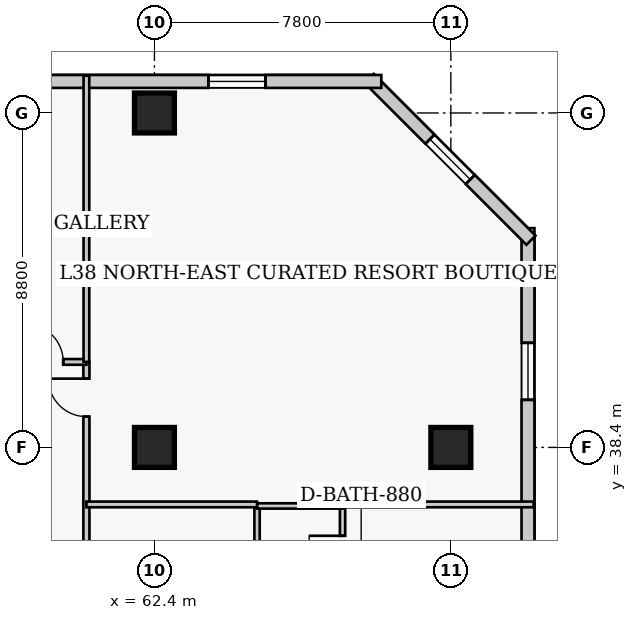
"""IFC4 building model, lengths in metres.
Left out: names, types, materials, properties, quantities, classifications, styles, units other than length and angle.
Written with IfcOpenShell. Run it as: python <this file> out.ifc"""

import sys

from ifc_helpers import new_model, si_unit, direction, frame, frame_2d, origin, origin_2d, place, context, subcontext, project, spatial, rectangle, extrude, element, fill, save


model = new_model("IFC4")
c1 = context("Model", 3, precision=1e-05, world=origin(), true_north=direction((0.0, 1.0)))
c2 = subcontext(c1, "Body", "Model", "MODEL_VIEW")
j1 = project(units=[si_unit("LENGTHUNIT", "METRE"), si_unit("PLANEANGLEUNIT", "RADIAN")], contexts=[c1])
p1 = place(None, origin())
s1 = spatial("IfcSite", under=j1, at=p1, CompositionType="ELEMENT")
p2 = place(p1, origin())
s2 = spatial("IfcBuilding", under=s1, at=p2, CompositionType="ELEMENT")
p3 = place(p2, frame((0.0, 0.0, 153.6)))
s3 = spatial("IfcBuildingStorey", under=s2, at=p3, CompositionType="ELEMENT", Elevation=153.6)
for number, where, z_axis, x_axis in (
    (1, (62.4, 38.4, 0.0), (0.0, 0.0, 1.0), (1.0, 0.0, 0.0)),
    (2, (62.4, 47.2, 0.0), (0.0, 0.0, 1.0), (1.0, 0.0, 0.0)),
    (3, (70.2, 38.4, 0.0), (0.0, 0.0, 1.0), (1.0, 0.0, 0.0)),
):
    element("IfcColumn", number, at=place(p3, frame(where, z_axis=z_axis, x_axis=x_axis)), inside=s3, PredefinedType="COLUMN", context=c2, shape_type="SweptSolid", body=[
        extrude(rectangle(XDim=1.05, YDim=1.05, at=origin_2d()), origin(), (0.0, 0.0, 1.0), 3.8),
    ])
p4 = place(p3, frame((72.23, 14.03, 0.0), z_axis=(0.0, 0.0, 1.0), x_axis=(0.0, 1.0, 0.0)))
e4 = element("IfcWall", 4, at=p4, inside=s3, PredefinedType="SOLIDWALL", context=c2, shape_type="SweptSolid", body=[
    extrude(rectangle(XDim=30.14, YDim=0.34, at=frame_2d((15.07, 0.0))), origin(), (0.0, 0.0, 1.0), 3.55),
])
p5 = place(p4, frame((3.018, 0.0, 0.85)))
e5 = element("IfcOpeningElement", 5, at=p5, cuts=e4, PredefinedType="OPENING", context=c2, shape_type="SweptSolid", body=[
    extrude(rectangle(XDim=1.5, YDim=1.75, at=frame_2d((0.75, 0.875))), frame((0.0, 0.18, 0.0), z_axis=(0.0, -1.0, 0.0), x_axis=(1.0, 0.0, 0.0)), (0.0, 0.0, 1.0), 0.36),
])
p6 = place(p4, frame((10.552, 0.0, 0.85)))
e6 = element("IfcOpeningElement", 6, at=p6, cuts=e4, PredefinedType="OPENING", context=c2, shape_type="SweptSolid", body=[
    extrude(rectangle(XDim=1.5, YDim=1.75, at=frame_2d((0.75, 0.875))), frame((0.0, 0.18, 0.0), z_axis=(0.0, -1.0, 0.0), x_axis=(1.0, 0.0, 0.0)), (0.0, 0.0, 1.0), 0.36),
])
p7 = place(p4, frame((18.087, 0.0, 0.85)))
e7 = element("IfcOpeningElement", 7, at=p7, cuts=e4, PredefinedType="OPENING", context=c2, shape_type="SweptSolid", body=[
    extrude(rectangle(XDim=1.5, YDim=1.75, at=frame_2d((0.75, 0.875))), frame((0.0, 0.18, 0.0), z_axis=(0.0, -1.0, 0.0), x_axis=(1.0, 0.0, 0.0)), (0.0, 0.0, 1.0), 0.36),
])
p8 = place(p4, frame((25.623, 0.0, 0.85)))
e8 = element("IfcOpeningElement", 8, at=p8, cuts=e4, PredefinedType="OPENING", context=c2, shape_type="SweptSolid", body=[
    extrude(rectangle(XDim=1.5, YDim=1.75, at=frame_2d((0.75, 0.875))), frame((0.0, 0.18, 0.0), z_axis=(0.0, -1.0, 0.0), x_axis=(1.0, 0.0, 0.0)), (0.0, 0.0, 1.0), 0.36),
])
p9 = place(p3, frame((72.308, 43.852, 0.0), z_axis=(0.0, 0.0, 1.0), x_axis=(-0.707106781187, 0.707106781187, 0.0)))
e9 = element("IfcWall", 9, at=p9, inside=s3, PredefinedType="SOLIDWALL", context=c2, shape_type="SweptSolid", body=[
    extrude(rectangle(XDim=6.02, YDim=0.34, at=frame_2d((3.01, 0.0))), origin(), (0.0, 0.0, 1.0), 3.55),
])
p10 = place(p9, frame((2.26, 0.0, 0.85)))
e10 = element("IfcOpeningElement", 10, at=p10, cuts=e9, PredefinedType="OPENING", context=c2, shape_type="SweptSolid", body=[
    extrude(rectangle(XDim=1.5, YDim=1.75, at=frame_2d((0.75, 0.875))), frame((0.0, 0.18, 0.0), z_axis=(0.0, -1.0, 0.0), x_axis=(1.0, 0.0, 0.0)), (0.0, 0.0, 1.0), 0.36),
])
p11 = place(p3, frame((68.37, 48.03, 0.0), z_axis=(0.0, 0.0, 1.0), x_axis=(-1.0, 0.0, 0.0)))
e11 = element("IfcWall", 11, at=p11, inside=s3, PredefinedType="SOLIDWALL", context=c2, shape_type="SweptSolid", body=[
    extrude(rectangle(XDim=26.69, YDim=0.34, at=frame_2d((13.345, 0.0))), origin(), (0.0, 0.0, 1.0), 3.55),
])
p12 = place(p11, frame((16.97, 0.0, 0.0)))
e12 = element("IfcOpeningElement", 12, at=p12, cuts=e11, PredefinedType="OPENING", context=c2, shape_type="SweptSolid", body=[
    extrude(rectangle(XDim=1.4, YDim=2.15, at=frame_2d((0.7, 1.075))), frame((0.0, 0.18, 0.0), z_axis=(0.0, -1.0, 0.0), x_axis=(1.0, 0.0, 0.0)), (0.0, 0.0, 1.0), 0.36),
])
p13 = place(p11, frame((3.048, 0.0, 0.85)))
e13 = element("IfcOpeningElement", 13, at=p13, cuts=e11, PredefinedType="OPENING", context=c2, shape_type="SweptSolid", body=[
    extrude(rectangle(XDim=1.5, YDim=1.75, at=frame_2d((0.75, 0.875))), frame((0.0, 0.18, 0.0), z_axis=(0.0, -1.0, 0.0), x_axis=(1.0, 0.0, 0.0)), (0.0, 0.0, 1.0), 0.36),
])
p14 = place(p11, frame((11.445, 0.0, 0.85)))
e14 = element("IfcOpeningElement", 14, at=p14, cuts=e11, PredefinedType="OPENING", context=c2, shape_type="SweptSolid", body=[
    extrude(rectangle(XDim=1.5, YDim=1.75, at=frame_2d((0.75, 0.875))), frame((0.0, 0.18, 0.0), z_axis=(0.0, -1.0, 0.0), x_axis=(1.0, 0.0, 0.0)), (0.0, 0.0, 1.0), 0.36),
])
p15 = place(p11, frame((22.642, 0.0, 0.85)))
e15 = element("IfcOpeningElement", 15, at=p15, cuts=e11, PredefinedType="OPENING", context=c2, shape_type="SweptSolid", body=[
    extrude(rectangle(XDim=1.5, YDim=1.75, at=frame_2d((0.75, 0.875))), frame((0.0, 0.18, 0.0), z_axis=(0.0, -1.0, 0.0), x_axis=(1.0, 0.0, 0.0)), (0.0, 0.0, 1.0), 0.36),
])
p16 = place(p3, frame((60.61, 12.05, 0.0), z_axis=(0.0, 0.0, 1.0), x_axis=(0.0, 1.0, 0.0)))
e16 = element("IfcWall", 16, at=p16, inside=s3, PredefinedType="PARTITIONING", context=c2, shape_type="SweptSolid", body=[
    extrude(rectangle(XDim=28.6, YDim=0.16, at=frame_2d((14.3, 0.0))), origin(), (0.0, 0.0, 1.0), 3.55),
])
p17 = place(p16, frame((3.5, 0.0, 0.0)))
e17 = element("IfcOpeningElement", 17, at=p17, cuts=e16, PredefinedType="OPENING", context=c2, shape_type="SweptSolid", body=[
    extrude(rectangle(XDim=0.95, YDim=2.1, at=frame_2d((0.475, 1.05))), frame((0.0, 0.09, 0.0), z_axis=(0.0, -1.0, 0.0), x_axis=(1.0, 0.0, 0.0)), (0.0, 0.0, 1.0), 0.18),
])
p18 = place(p16, frame((11.875, 0.0, 0.0)))
e18 = element("IfcOpeningElement", 18, at=p18, cuts=e16, PredefinedType="OPENING", context=c2, shape_type="SweptSolid", body=[
    extrude(rectangle(XDim=0.95, YDim=2.1, at=frame_2d((0.475, 1.05))), frame((0.0, 0.09, 0.0), z_axis=(0.0, -1.0, 0.0), x_axis=(1.0, 0.0, 0.0)), (0.0, 0.0, 1.0), 0.18),
])
p19 = place(p16, frame((20.325, 0.0, 0.0)))
e19 = element("IfcOpeningElement", 19, at=p19, cuts=e16, PredefinedType="OPENING", context=c2, shape_type="SweptSolid", body=[
    extrude(rectangle(XDim=0.95, YDim=2.1, at=frame_2d((0.475, 1.05))), frame((0.0, 0.09, 0.0), z_axis=(0.0, -1.0, 0.0), x_axis=(1.0, 0.0, 0.0)), (0.0, 0.0, 1.0), 0.18),
])
p20 = place(p16, frame((27.16, 0.0, 0.0)))
e20 = element("IfcOpeningElement", 20, at=p20, cuts=e16, PredefinedType="OPENING", context=c2, shape_type="SweptSolid", body=[
    extrude(rectangle(XDim=1.0, YDim=2.15, at=frame_2d((0.5, 1.075))), frame((0.0, 0.09, 0.0), z_axis=(0.0, -1.0, 0.0), x_axis=(1.0, 0.0, 0.0)), (0.0, 0.0, 1.0), 0.18),
])
p21 = place(p3, frame((56.8, 40.65, 0.0), z_axis=(0.0, 0.0, 1.0), x_axis=(1.0, 0.0, 0.0)))
e21 = element("IfcWall", 21, at=p21, inside=s3, PredefinedType="PARTITIONING", context=c2, shape_type="SweptSolid", body=[
    extrude(rectangle(XDim=3.81, YDim=0.15, at=frame_2d((1.905, 0.0))), origin(), (0.0, 0.0, 1.0), 3.55),
])
p22 = place(p21, frame((2.2, 0.0, 0.0)))
e22 = element("IfcOpeningElement", 22, at=p22, cuts=e21, PredefinedType="OPENING", context=c2, shape_type="SweptSolid", body=[
    extrude(rectangle(XDim=1.0, YDim=2.15, at=frame_2d((0.5, 1.075))), frame((0.0, 0.085, 0.0), z_axis=(0.0, -1.0, 0.0), x_axis=(1.0, 0.0, 0.0)), (0.0, 0.0, 1.0), 0.17),
])
p23 = place(p3, frame((60.61, 40.65, 0.0), z_axis=(0.0, 0.0, 1.0), x_axis=(0.0, 1.0, 0.0)))
e23 = element("IfcWall", 23, at=p23, inside=s3, PredefinedType="PARTITIONING", context=c2, shape_type="SweptSolid", body=[
    extrude(rectangle(XDim=7.53, YDim=0.15, at=frame_2d((3.765, 0.0))), origin(), (0.0, 0.0, 1.0), 3.55),
])
p24 = place(p3, frame((65.1, 34.41, 0.0), z_axis=(0.0, 0.0, 1.0), x_axis=(0.0, 1.0, 0.0)))
e24 = element("IfcWall", 24, at=p24, inside=s3, PredefinedType="PLUMBINGWALL", context=c2, shape_type="SweptSolid", body=[
    extrude(rectangle(XDim=2.45, YDim=0.14, at=frame_2d((1.225, 0.0))), origin(), (0.0, 0.0, 1.0), 3.55),
])
p25 = place(p3, frame((67.35, 34.41, 0.0), z_axis=(0.0, 0.0, 1.0), x_axis=(0.0, 1.0, 0.0)))
e25 = element("IfcWall", 25, at=p25, inside=s3, PredefinedType="PLUMBINGWALL", context=c2, shape_type="SweptSolid", body=[
    extrude(rectangle(XDim=2.45, YDim=0.14, at=frame_2d((1.225, 0.0))), origin(), (0.0, 0.0, 1.0), 3.55),
])
p26 = place(p25, frame((0.785, 0.0, 0.0)))
e26 = element("IfcOpeningElement", 26, at=p26, cuts=e25, PredefinedType="OPENING", context=c2, shape_type="SweptSolid", body=[
    extrude(rectangle(XDim=0.88, YDim=2.05, at=frame_2d((0.44, 1.025))), frame((0.0, 0.08, 0.0), z_axis=(0.0, -1.0, 0.0), x_axis=(1.0, 0.0, 0.0)), (0.0, 0.0, 1.0), 0.16),
])
p27 = place(p3, frame((65.1, 36.86, 0.0), z_axis=(0.0, 0.0, 1.0), x_axis=(1.0, 0.0, 0.0)))
e27 = element("IfcWall", 27, at=p27, inside=s3, PredefinedType="PLUMBINGWALL", context=c2, shape_type="SweptSolid", body=[
    extrude(rectangle(XDim=2.25, YDim=0.14, at=frame_2d((1.125, 0.0))), origin(), (0.0, 0.0, 1.0), 3.55),
])
p28 = place(p3, frame((60.61, 36.9, 0.0), z_axis=(0.0, 0.0, 1.0), x_axis=(1.0, 0.0, 0.0)))
e28 = element("IfcWall", 28, at=p28, inside=s3, PredefinedType="PARTITIONING", context=c2, shape_type="SweptSolid", body=[
    extrude(rectangle(XDim=4.49, YDim=0.15, at=frame_2d((2.245, 0.0))), origin(), (0.0, 0.0, 1.0), 3.55),
])
p29 = place(p3, frame((67.35, 36.9, 0.0), z_axis=(0.0, 0.0, 1.0), x_axis=(1.0, 0.0, 0.0)))
e29 = element("IfcWall", 29, at=p29, inside=s3, PredefinedType="PARTITIONING", context=c2, shape_type="SweptSolid", body=[
    extrude(rectangle(XDim=5.03, YDim=0.15, at=frame_2d((2.515, 0.0))), origin(), (0.0, 0.0, 1.0), 3.55),
])
p30 = place(p8, origin())
e30 = element("IfcWindow", 30, at=p30, inside=s3, PartitioningType="SINGLE_PANEL", PredefinedType="WINDOW", context=c2, shape_type="SweptSolid", body=[
    extrude(rectangle(XDim=1.5, YDim=1.75, at=frame_2d((0.75, 0.875))), frame((0.0, 0.03, 0.0), z_axis=(0.0, -1.0, 0.0), x_axis=(1.0, 0.0, 0.0)), (0.0, 0.0, 1.0), 0.06),
])
fill(e8, e30)
p31 = place(p10, origin())
e31 = element("IfcWindow", 31, at=p31, inside=s3, PartitioningType="SINGLE_PANEL", PredefinedType="WINDOW", context=c2, shape_type="SweptSolid", body=[
    extrude(rectangle(XDim=1.5, YDim=1.75, at=frame_2d((0.75, 0.875))), frame((0.0, 0.03, 0.0), z_axis=(0.0, -1.0, 0.0), x_axis=(1.0, 0.0, 0.0)), (0.0, 0.0, 1.0), 0.06),
])
fill(e10, e31)
p32 = place(p13, origin())
e32 = element("IfcWindow", 32, at=p32, inside=s3, PartitioningType="SINGLE_PANEL", PredefinedType="WINDOW", context=c2, shape_type="SweptSolid", body=[
    extrude(rectangle(XDim=1.5, YDim=1.75, at=frame_2d((0.75, 0.875))), frame((0.0, 0.03, 0.0), z_axis=(0.0, -1.0, 0.0), x_axis=(1.0, 0.0, 0.0)), (0.0, 0.0, 1.0), 0.06),
])
fill(e13, e32)
p33 = place(p22, origin())
e33 = element("IfcDoor", 33, at=p33, inside=s3, OperationType="SINGLE_SWING_LEFT", PredefinedType="DOOR", context=c2, shape_type="SweptSolid", body=[
    extrude(rectangle(XDim=1.0, YDim=2.15, at=frame_2d((0.5, 1.075))), frame((0.0, 0.025, 0.0), z_axis=(0.0, -1.0, 0.0), x_axis=(1.0, 0.0, 0.0)), (0.0, 0.0, 1.0), 0.05),
])
fill(e22, e33)
p34 = place(p26, origin())
e34 = element("IfcDoor", 34, at=p34, inside=s3, OperationType="SINGLE_SWING_RIGHT", PredefinedType="DOOR", context=c2, shape_type="SweptSolid", body=[
    extrude(rectangle(XDim=0.88, YDim=2.05, at=frame_2d((0.44, 1.025))), frame((0.0, 0.025, 0.0), z_axis=(0.0, -1.0, 0.0), x_axis=(1.0, 0.0, 0.0)), (0.0, 0.0, 1.0), 0.05),
])
fill(e26, e34)
p35 = place(p20, origin())
e35 = element("IfcDoor", 35, at=p35, inside=s3, OperationType="SINGLE_SWING_RIGHT", PredefinedType="DOOR", context=c2, shape_type="SweptSolid", body=[
    extrude(rectangle(XDim=1.0, YDim=2.15, at=frame_2d((0.5, 1.075))), frame((0.0, 0.025, 0.0), z_axis=(0.0, -1.0, 0.0), x_axis=(1.0, 0.0, 0.0)), (0.0, 0.0, 1.0), 0.05),
])
fill(e20, e35)
save(model, sys.argv[1])
